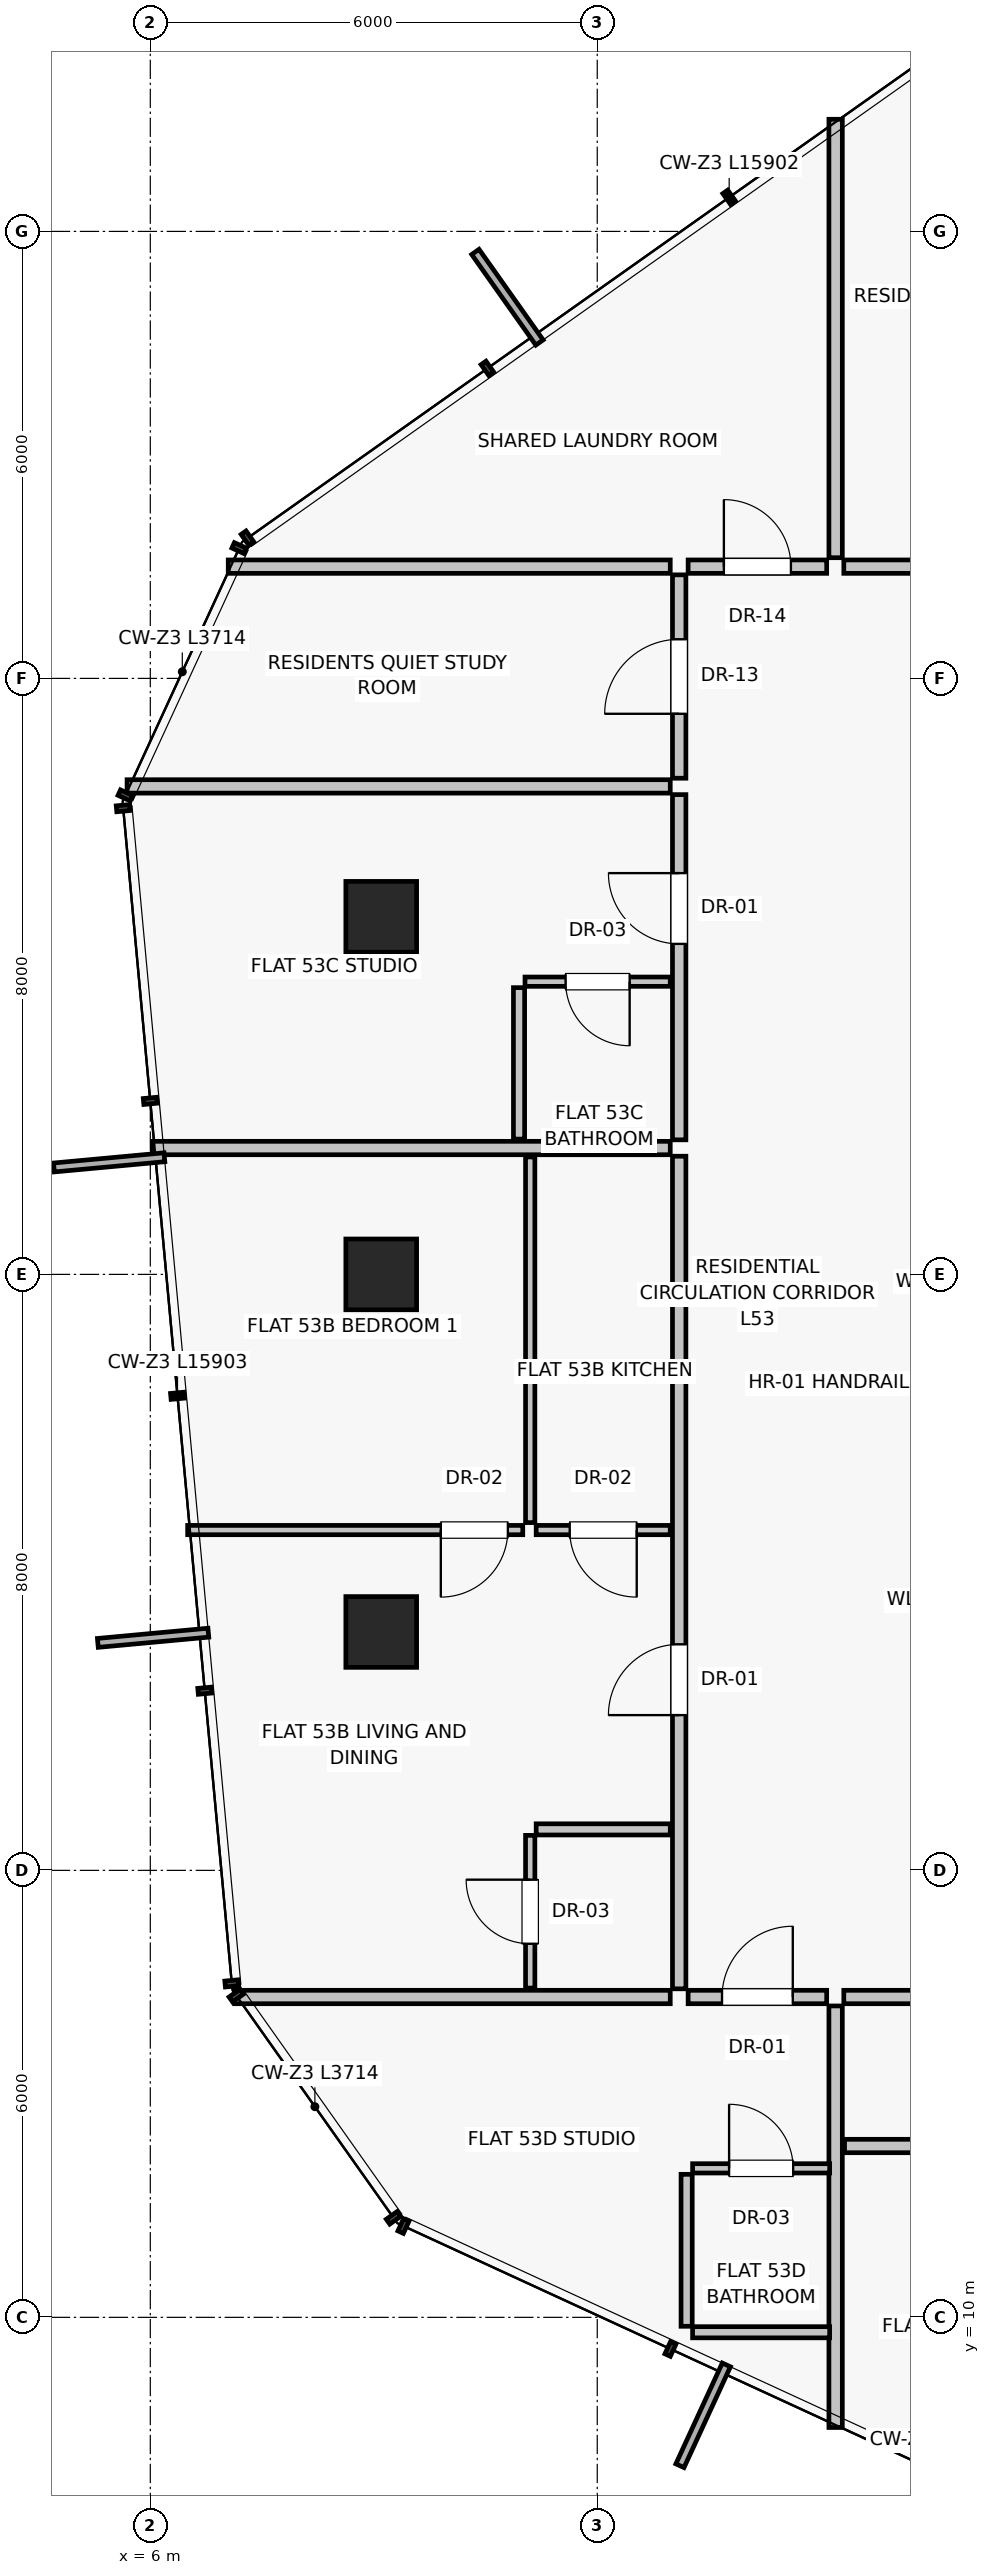
"""IFC4 building model, lengths in metres.
Left out: names, types, materials, properties, quantities, classifications, styles, units other than length and angle.
Written with IfcOpenShell. Run it as: python <this file> out.ifc"""

import sys

from ifc_helpers import new_model, si_unit, direction, frame, frame_2d, origin, origin_2d, place, context, subcontext, project, spatial, rectangle, extrude, source, transform, mapped, element, fill, save


model = new_model("IFC4")
c1 = context("Model", 3, precision=1e-05, world=origin(), true_north=direction((0.0, 1.0)))
c2 = subcontext(c1, "Body", "Model", "MODEL_VIEW")
j1 = project(units=[si_unit("LENGTHUNIT", "METRE"), si_unit("PLANEANGLEUNIT", "RADIAN")], contexts=[c1])
p1 = place(None, origin())
s1 = spatial("IfcSite", under=j1, at=p1, CompositionType="ELEMENT")
p2 = place(p1, origin())
s2 = spatial("IfcBuilding", under=s1, at=p2, CompositionType="ELEMENT")
p3 = place(p2, frame((0.0, 0.0, 188.6)))
s3 = spatial("IfcBuildingStorey", under=s2, at=p3, CompositionType="ELEMENT", Elevation=188.6)
for number, where, z_axis, x_axis in (
    (1, (9.1, 28.8, 0.0), (0.0, 0.0, 1.0), (1.0, 0.0, 0.0)),
    (2, (9.1, 24.0, 0.0), (0.0, 0.0, 1.0), (1.0, 0.0, 0.0)),
    (3, (9.1, 19.2, 0.0), (0.0, 0.0, 1.0), (1.0, 0.0, 0.0)),
):
    element("IfcColumn", number, at=place(p3, frame(where, z_axis=z_axis, x_axis=x_axis)), inside=s3, PredefinedType="COLUMN", context=c2, shape_type="SweptSolid", body=[
        extrude(rectangle(XDim=0.95, YDim=0.95, at=origin_2d()), origin(), (0.0, 0.0, 1.0), 3.25),
    ])
p4 = place(p3, frame((15.2, 14.18, 0.0), z_axis=(0.0, 0.0, 1.0), x_axis=(0.0, -1.0, 0.0)))
e4 = element("IfcWall", 4, at=p4, inside=s3, PredefinedType="PARTITIONING", context=c2, shape_type="SweptSolid", body=[
    extrude(rectangle(XDim=5.658, YDim=0.18, at=frame_2d((2.829, 0.0))), origin(), (0.0, 0.0, 1.0), 3.015),
])
p5 = place(p3, frame((15.31, 14.3, 0.0), z_axis=(0.0, 0.0, 1.0), x_axis=(1.0, 0.0, 0.0)))
e5 = element("IfcWall", 5, at=p5, inside=s3, PredefinedType="PARTITIONING", context=c2, shape_type="SweptSolid", body=[
    extrude(rectangle(XDim=3.78, YDim=0.18, at=frame_2d((1.89, 0.0))), origin(), (0.0, 0.0, 1.0), 3.015),
])
p6 = place(p5, frame((1.39, 0.0, 0.0)))
e6 = element("IfcOpeningElement", 6, at=p6, cuts=e5, PredefinedType="OPENING", context=c2, shape_type="SweptSolid", body=[
    extrude(rectangle(XDim=1.0, YDim=2.01, at=frame_2d((0.5, 1.005))), frame((0.0, 0.1, 0.0), z_axis=(0.0, -1.0, 0.0), x_axis=(1.0, 0.0, 0.0)), (0.0, 0.0, 1.0), 0.2),
])
p7 = place(p3, frame((15.32, 12.3, 0.0), z_axis=(0.0, 0.0, 1.0), x_axis=(1.0, 0.0, 0.0)))
e7 = element("IfcWall", 7, at=p7, inside=s3, PredefinedType="PARTITIONING", context=c2, shape_type="SweptSolid", body=[
    extrude(rectangle(XDim=3.78, YDim=0.18, at=frame_2d((1.89, 0.0))), origin(), (0.0, 0.0, 1.0), 3.015),
])
p8 = place(p3, frame((15.2, 33.62, 0.0), z_axis=(0.0, 0.0, 1.0), x_axis=(0.0, 1.0, 0.0)))
e8 = element("IfcWall", 8, at=p8, inside=s3, PredefinedType="PARTITIONING", context=c2, shape_type="SweptSolid", body=[
    extrude(rectangle(XDim=5.885, YDim=0.18, at=frame_2d((2.943, 0.0))), origin(), (0.0, 0.0, 1.0), 3.015),
])
p9 = place(p3, frame((15.31, 33.5, 0.0), z_axis=(0.0, 0.0, 1.0), x_axis=(1.0, 0.0, 0.0)))
e9 = element("IfcWall", 9, at=p9, inside=s3, PredefinedType="PARTITIONING", context=c2, shape_type="SweptSolid", body=[
    extrude(rectangle(XDim=3.493, YDim=0.18, at=frame_2d((1.747, 0.0))), origin(), (0.0, 0.0, 1.0), 3.015),
])
p10 = place(p9, frame((1.247, 0.0, 0.0)))
e10 = element("IfcOpeningElement", 10, at=p10, cuts=e9, PredefinedType="OPENING", context=c2, shape_type="SweptSolid", body=[
    extrude(rectangle(XDim=1.0, YDim=2.01, at=frame_2d((0.5, 1.005))), frame((0.0, 0.1, 0.0), z_axis=(0.0, -1.0, 0.0), x_axis=(1.0, 0.0, 0.0)), (0.0, 0.0, 1.0), 0.2),
])
p11 = place(p3, frame((12.98, 14.3, 0.0), z_axis=(0.0, 0.0, 1.0), x_axis=(-1.0, 0.0, 0.0)))
e11 = element("IfcWall", 11, at=p11, inside=s3, PredefinedType="PARTITIONING", context=c2, shape_type="SweptSolid", body=[
    extrude(rectangle(XDim=5.849, YDim=0.18, at=frame_2d((2.924, 0.0))), origin(), (0.0, 0.0, 1.0), 3.015),
])
p12 = place(p3, frame((12.98, 33.5, 0.0), z_axis=(0.0, 0.0, 1.0), x_axis=(-1.0, 0.0, 0.0)))
e12 = element("IfcWall", 12, at=p12, inside=s3, PredefinedType="PARTITIONING", context=c2, shape_type="SweptSolid", body=[
    extrude(rectangle(XDim=5.934, YDim=0.18, at=frame_2d((2.967, 0.0))), origin(), (0.0, 0.0, 1.0), 3.015),
])
p13 = place(p3, frame((13.1, 14.41, 0.0), z_axis=(0.0, 0.0, 1.0), x_axis=(0.0, 1.0, 0.0)))
e13 = element("IfcWall", 13, at=p13, inside=s3, PredefinedType="PARTITIONING", context=c2, shape_type="SweptSolid", body=[
    extrude(rectangle(XDim=11.176, YDim=0.18, at=frame_2d((5.588, 0.0))), origin(), (0.0, 0.0, 1.0), 2.662),
])
p14 = place(p13, frame((3.674, 0.0, 0.0)))
e14 = element("IfcOpeningElement", 14, at=p14, cuts=e13, PredefinedType="OPENING", context=c2, shape_type="SweptSolid", body=[
    extrude(rectangle(XDim=0.95, YDim=2.02, at=frame_2d((0.475, 1.01))), frame((0.0, 0.1, 0.0), z_axis=(0.0, -1.0, 0.0), x_axis=(1.0, 0.0, 0.0)), (0.0, 0.0, 1.0), 0.2),
])
p15 = place(p3, frame((12.98, 16.55, 0.0), z_axis=(0.0, 0.0, 1.0), x_axis=(-1.0, 0.0, 0.0)))
e15 = element("IfcWall", 15, at=p15, inside=s3, PredefinedType="PARTITIONING", context=c2, shape_type="SweptSolid", body=[
    extrude(rectangle(XDim=1.8, YDim=0.15, at=frame_2d((0.9, 0.0))), origin(), (0.0, 0.0, 1.0), 3.015),
])
p16 = place(p3, frame((11.1, 14.42, 0.0), z_axis=(0.0, 0.0, 1.0), x_axis=(0.0, 1.0, 0.0)))
e16 = element("IfcWall", 16, at=p16, inside=s3, PredefinedType="PARTITIONING", context=c2, shape_type="SweptSolid", body=[
    extrude(rectangle(XDim=2.05, YDim=0.125, at=frame_2d((1.025, 0.0))), origin(), (0.0, 0.0, 1.0), 3.015),
])
p17 = place(p16, frame((0.595, 0.0, 0.0)))
e17 = element("IfcOpeningElement", 17, at=p17, cuts=e16, PredefinedType="OPENING", context=c2, shape_type="SweptSolid", body=[
    extrude(rectangle(XDim=0.86, YDim=2.01, at=frame_2d((0.43, 1.005))), frame((0.0, 0.073, 0.0), z_axis=(0.0, -1.0, 0.0), x_axis=(1.0, 0.0, 0.0)), (0.0, 0.0, 1.0), 0.145),
])
p18 = place(p3, frame((12.98, 20.568, 0.0), z_axis=(0.0, 0.0, 1.0), x_axis=(-1.0, 0.0, 0.0)))
e18 = element("IfcWall", 18, at=p18, inside=s3, PredefinedType="PARTITIONING", context=c2, shape_type="SweptSolid", body=[
    extrude(rectangle(XDim=1.8, YDim=0.125, at=frame_2d((0.9, 0.0))), origin(), (0.0, 0.0, 1.0), 3.015),
])
p19 = place(p18, frame((0.45, 0.0, 0.0)))
e19 = element("IfcOpeningElement", 19, at=p19, cuts=e18, PredefinedType="OPENING", context=c2, shape_type="SweptSolid", body=[
    extrude(rectangle(XDim=0.9, YDim=2.01, at=frame_2d((0.45, 1.005))), frame((0.0, 0.073, 0.0), z_axis=(0.0, -1.0, 0.0), x_axis=(1.0, 0.0, 0.0)), (0.0, 0.0, 1.0), 0.145),
])
p20 = place(p3, frame((11.1, 20.668, 0.0), z_axis=(0.0, 0.0, 1.0), x_axis=(0.0, 1.0, 0.0)))
e20 = element("IfcWall", 20, at=p20, inside=s3, PredefinedType="PARTITIONING", context=c2, shape_type="SweptSolid", body=[
    extrude(rectangle(XDim=4.908, YDim=0.125, at=frame_2d((2.454, 0.0))), origin(), (0.0, 0.0, 1.0), 3.015),
])
p21 = place(p3, frame((11.0, 20.568, 0.0), z_axis=(0.0, 0.0, 1.0), x_axis=(-1.0, 0.0, 0.0)))
e21 = element("IfcWall", 21, at=p21, inside=s3, PredefinedType="PARTITIONING", context=c2, shape_type="SweptSolid", body=[
    extrude(rectangle(XDim=4.499, YDim=0.125, at=frame_2d((2.25, 0.0))), origin(), (0.0, 0.0, 1.0), 3.015),
])
p22 = place(p21, frame((0.2, 0.0, 0.0)))
e22 = element("IfcOpeningElement", 22, at=p22, cuts=e21, PredefinedType="OPENING", context=c2, shape_type="SweptSolid", body=[
    extrude(rectangle(XDim=0.9, YDim=2.01, at=frame_2d((0.45, 1.005))), frame((0.0, 0.073, 0.0), z_axis=(0.0, -1.0, 0.0), x_axis=(1.0, 0.0, 0.0)), (0.0, 0.0, 1.0), 0.145),
])
p23 = place(p3, frame((12.98, 25.696, 0.0), z_axis=(0.0, 0.0, 1.0), x_axis=(-1.0, 0.0, 0.0)))
e23 = element("IfcWall", 23, at=p23, inside=s3, PredefinedType="PARTITIONING", context=c2, shape_type="SweptSolid", body=[
    extrude(rectangle(XDim=6.953, YDim=0.18, at=frame_2d((3.476, 0.0))), origin(), (0.0, 0.0, 1.0), 3.015),
])
p24 = place(p3, frame((13.1, 30.66, 0.0), z_axis=(0.0, 0.0, 1.0), x_axis=(0.0, 1.0, 0.0)))
e24 = element("IfcWall", 24, at=p24, inside=s3, PredefinedType="PARTITIONING", context=c2, shape_type="SweptSolid", body=[
    extrude(rectangle(XDim=2.73, YDim=0.18, at=frame_2d((1.365, 0.0))), origin(), (0.0, 0.0, 1.0), 3.015),
])
p25 = place(p24, frame((0.865, 0.0, 0.0)))
e25 = element("IfcOpeningElement", 25, at=p25, cuts=e24, PredefinedType="OPENING", context=c2, shape_type="SweptSolid", body=[
    extrude(rectangle(XDim=1.0, YDim=2.01, at=frame_2d((0.5, 1.005))), frame((0.0, 0.1, 0.0), z_axis=(0.0, -1.0, 0.0), x_axis=(1.0, 0.0, 0.0)), (0.0, 0.0, 1.0), 0.2),
])
p26 = place(p3, frame((12.98, 30.55, 0.0), z_axis=(0.0, 0.0, 1.0), x_axis=(-1.0, 0.0, 0.0)))
e26 = element("IfcWall", 26, at=p26, inside=s3, PredefinedType="PARTITIONING", context=c2, shape_type="SweptSolid", body=[
    extrude(rectangle(XDim=7.292, YDim=0.18, at=frame_2d((3.646, 0.0))), origin(), (0.0, 0.0, 1.0), 3.015),
])
p27 = place(p3, frame((13.1, 25.806, 0.0), z_axis=(0.0, 0.0, 1.0), x_axis=(0.0, 1.0, 0.0)))
e27 = element("IfcWall", 27, at=p27, inside=s3, PredefinedType="PARTITIONING", context=c2, shape_type="SweptSolid", body=[
    extrude(rectangle(XDim=4.634, YDim=0.18, at=frame_2d((2.317, 0.0))), origin(), (0.0, 0.0, 1.0), 2.662),
])
p28 = place(p27, frame((2.63, 0.0, 0.0)))
e28 = element("IfcOpeningElement", 28, at=p28, cuts=e27, PredefinedType="OPENING", context=c2, shape_type="SweptSolid", body=[
    extrude(rectangle(XDim=0.95, YDim=2.02, at=frame_2d((0.475, 1.01))), frame((0.0, 0.1, 0.0), z_axis=(0.0, -1.0, 0.0), x_axis=(1.0, 0.0, 0.0)), (0.0, 0.0, 1.0), 0.2),
])
p29 = place(p3, frame((12.98, 27.929, 0.0), z_axis=(0.0, 0.0, 1.0), x_axis=(-1.0, 0.0, 0.0)))
e29 = element("IfcWall", 29, at=p29, inside=s3, PredefinedType="PARTITIONING", context=c2, shape_type="SweptSolid", body=[
    extrude(rectangle(XDim=1.95, YDim=0.125, at=frame_2d((0.975, 0.0))), origin(), (0.0, 0.0, 1.0), 3.015),
])
p30 = place(p29, frame((0.545, 0.0, 0.0)))
e30 = element("IfcOpeningElement", 30, at=p30, cuts=e29, PredefinedType="OPENING", context=c2, shape_type="SweptSolid", body=[
    extrude(rectangle(XDim=0.86, YDim=2.01, at=frame_2d((0.43, 1.005))), frame((0.0, 0.073, 0.0), z_axis=(0.0, -1.0, 0.0), x_axis=(1.0, 0.0, 0.0)), (0.0, 0.0, 1.0), 0.145),
])
p31 = place(p3, frame((10.95, 25.816, 0.0), z_axis=(0.0, 0.0, 1.0), x_axis=(0.0, 1.0, 0.0)))
e31 = element("IfcWall", 31, at=p31, inside=s3, PredefinedType="PARTITIONING", context=c2, shape_type="SweptSolid", body=[
    extrude(rectangle(XDim=2.033, YDim=0.15, at=frame_2d((1.017, 0.0))), origin(), (0.0, 0.0, 1.0), 3.015),
])
p32 = place(p3, frame((13.22, 14.3, 0.0), z_axis=(0.0, 0.0, 1.0), x_axis=(1.0, 0.0, 0.0)))
e32 = element("IfcWall", 32, at=p32, inside=s3, PredefinedType="PARTITIONING", context=c2, shape_type="SweptSolid", body=[
    extrude(rectangle(XDim=1.86, YDim=0.18, at=frame_2d((0.93, 0.0))), origin(), (0.0, 0.0, 1.0), 3.015),
])
p33 = place(p32, frame((0.455, 0.0, 0.0)))
e33 = element("IfcOpeningElement", 33, at=p33, cuts=e32, PredefinedType="OPENING", context=c2, shape_type="SweptSolid", body=[
    extrude(rectangle(XDim=0.95, YDim=2.02, at=frame_2d((0.475, 1.01))), frame((0.0, 0.1, 0.0), z_axis=(0.0, -1.0, 0.0), x_axis=(1.0, 0.0, 0.0)), (0.0, 0.0, 1.0), 0.2),
])
p34 = place(p3, frame((13.28, 12.0, 0.0), z_axis=(0.0, 0.0, 1.0), x_axis=(1.0, 0.0, 0.0)))
e34 = element("IfcWall", 34, at=p34, inside=s3, PredefinedType="PARTITIONING", context=c2, shape_type="SweptSolid", body=[
    extrude(rectangle(XDim=1.84, YDim=0.125, at=frame_2d((0.92, 0.0))), origin(), (0.0, 0.0, 1.0), 3.015),
])
p35 = place(p34, frame((0.49, 0.0, 0.0)))
e35 = element("IfcOpeningElement", 35, at=p35, cuts=e34, PredefinedType="OPENING", context=c2, shape_type="SweptSolid", body=[
    extrude(rectangle(XDim=0.86, YDim=2.01, at=frame_2d((0.43, 1.005))), frame((0.0, 0.073, 0.0), z_axis=(0.0, -1.0, 0.0), x_axis=(1.0, 0.0, 0.0)), (0.0, 0.0, 1.0), 0.145),
])
p36 = place(p3, frame((13.28, 9.8, 0.0), z_axis=(0.0, 0.0, 1.0), x_axis=(1.0, 0.0, 0.0)))
e36 = element("IfcWall", 36, at=p36, inside=s3, PredefinedType="PARTITIONING", context=c2, shape_type="SweptSolid", body=[
    extrude(rectangle(XDim=1.84, YDim=0.15, at=frame_2d((0.92, 0.0))), origin(), (0.0, 0.0, 1.0), 3.015),
])
p37 = place(p3, frame((13.2, 9.88, 0.0), z_axis=(0.0, 0.0, 1.0), x_axis=(0.0, 1.0, 0.0)))
e37 = element("IfcWall", 37, at=p37, inside=s3, PredefinedType="PARTITIONING", context=c2, shape_type="SweptSolid", body=[
    extrude(rectangle(XDim=2.04, YDim=0.15, at=frame_2d((1.02, 0.0))), origin(), (0.0, 0.0, 1.0), 3.015),
])
p38 = place(p3, frame((13.22, 33.5, 0.0), z_axis=(0.0, 0.0, 1.0), x_axis=(1.0, 0.0, 0.0)))
e38 = element("IfcWall", 38, at=p38, inside=s3, PredefinedType="PARTITIONING", context=c2, shape_type="SweptSolid", body=[
    extrude(rectangle(XDim=1.86, YDim=0.18, at=frame_2d((0.93, 0.0))), origin(), (0.0, 0.0, 1.0), 3.015),
])
p39 = place(p38, frame((0.48, 0.0, 0.0)))
e39 = element("IfcOpeningElement", 39, at=p39, cuts=e38, PredefinedType="OPENING", context=c2, shape_type="SweptSolid", body=[
    extrude(rectangle(XDim=0.9, YDim=2.01, at=frame_2d((0.45, 1.005))), frame((0.0, 0.1, 0.0), z_axis=(0.0, -1.0, 0.0), x_axis=(1.0, 0.0, 0.0)), (0.0, 0.0, 1.0), 0.2),
])
m1 = source(origin(), c2, "Body", "SweptSolid", [
    extrude(rectangle(XDim=0.95, YDim=2.02, at=frame_2d((0.475, 1.01))), frame((0.0, 0.025, 0.0), z_axis=(0.0, -1.0, 0.0), x_axis=(1.0, 0.0, 0.0)), (0.0, 0.0, 1.0), 0.05),
])
p40 = place(p14, origin())
e40 = element("IfcDoor", 40, at=p40, inside=s3, OperationType="SINGLE_SWING_LEFT", PredefinedType="DOOR", context=c2, shape_type="MappedRepresentation", body=[
    mapped(m1, transform((0.0, 0.0, 0.0), scale=1.0)),
])
fill(e14, e40)
m2 = source(origin(), c2, "Body", "SweptSolid", [
    extrude(rectangle(XDim=0.86, YDim=2.01, at=frame_2d((0.43, 1.005))), frame((0.0, 0.025, 0.0), z_axis=(0.0, -1.0, 0.0), x_axis=(1.0, 0.0, 0.0)), (0.0, 0.0, 1.0), 0.05),
])
p41 = place(p17, origin())
e41 = element("IfcDoor", 41, at=p41, inside=s3, OperationType="SINGLE_SWING_RIGHT", PredefinedType="DOOR", context=c2, shape_type="MappedRepresentation", body=[
    mapped(m2, transform((0.0, 0.0, 0.0), scale=1.0)),
])
fill(e17, e41)
m3 = source(origin(), c2, "Body", "SweptSolid", [
    extrude(rectangle(XDim=0.9, YDim=2.01, at=frame_2d((0.45, 1.005))), frame((0.0, 0.025, 0.0), z_axis=(0.0, -1.0, 0.0), x_axis=(1.0, 0.0, 0.0)), (0.0, 0.0, 1.0), 0.05),
])
p42 = place(p19, origin())
e42 = element("IfcDoor", 42, at=p42, inside=s3, OperationType="SINGLE_SWING_LEFT", PredefinedType="DOOR", context=c2, shape_type="MappedRepresentation", body=[
    mapped(m3, transform((0.0, 0.0, 0.0), scale=1.0)),
])
fill(e19, e42)
p43 = place(p22, origin())
e43 = element("IfcDoor", 43, at=p43, inside=s3, OperationType="SINGLE_SWING_RIGHT", PredefinedType="DOOR", context=c2, shape_type="MappedRepresentation", body=[
    mapped(m3, transform((0.0, 0.0, 0.0), scale=1.0)),
])
fill(e22, e43)
m4 = source(origin(), c2, "Body", "SweptSolid", [
    extrude(rectangle(XDim=1.0, YDim=2.01, at=frame_2d((0.5, 1.005))), frame((0.0, 0.025, 0.0), z_axis=(0.0, -1.0, 0.0), x_axis=(1.0, 0.0, 0.0)), (0.0, 0.0, 1.0), 0.05),
])
p44 = place(p25, origin())
e44 = element("IfcDoor", 44, at=p44, inside=s3, OperationType="SINGLE_SWING_LEFT", PredefinedType="DOOR", context=c2, shape_type="MappedRepresentation", body=[
    mapped(m4, transform((0.0, 0.0, 0.0), scale=1.0)),
])
fill(e25, e44)
p45 = place(p28, origin())
e45 = element("IfcDoor", 45, at=p45, inside=s3, OperationType="SINGLE_SWING_RIGHT", PredefinedType="DOOR", context=c2, shape_type="MappedRepresentation", body=[
    mapped(m1, transform((0.0, 0.0, 0.0), scale=1.0)),
])
fill(e28, e45)
p46 = place(p30, origin())
e46 = element("IfcDoor", 46, at=p46, inside=s3, OperationType="SINGLE_SWING_LEFT", PredefinedType="DOOR", context=c2, shape_type="MappedRepresentation", body=[
    mapped(m2, transform((0.0, 0.0, 0.0), scale=1.0)),
])
fill(e30, e46)
p47 = place(p33, origin())
e47 = element("IfcDoor", 47, at=p47, inside=s3, OperationType="SINGLE_SWING_RIGHT", PredefinedType="DOOR", context=c2, shape_type="MappedRepresentation", body=[
    mapped(m1, transform((0.0, 0.0, 0.0), scale=1.0)),
])
fill(e33, e47)
p48 = place(p35, origin())
e48 = element("IfcDoor", 48, at=p48, inside=s3, OperationType="SINGLE_SWING_LEFT", PredefinedType="DOOR", context=c2, shape_type="MappedRepresentation", body=[
    mapped(m2, transform((0.0, 0.0, 0.0), scale=1.0)),
])
fill(e35, e48)
p49 = place(p39, origin())
e49 = element("IfcDoor", 49, at=p49, inside=s3, OperationType="SINGLE_SWING_LEFT", PredefinedType="DOOR", context=c2, shape_type="MappedRepresentation", body=[
    mapped(m3, transform((0.0, 0.0, 0.0), scale=1.0)),
])
fill(e39, e49)
save(model, sys.argv[1])
